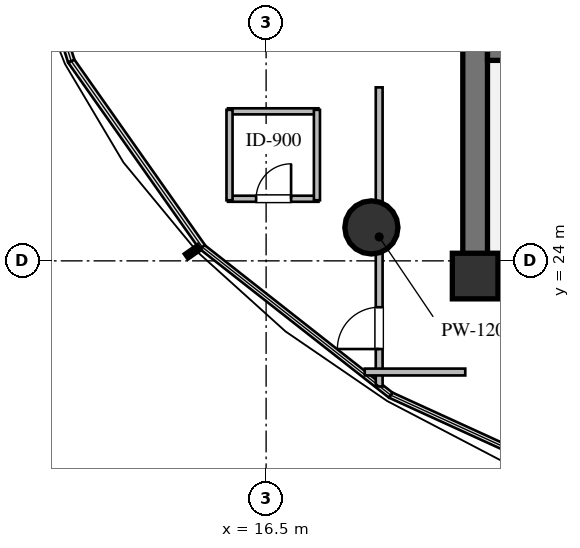
"""IFC4 building model, lengths in metres.
Left out: names, types, materials, properties, quantities, classifications, styles, units other than length and angle.
Written with IfcOpenShell. Run it as: python <this file> out.ifc"""

import sys

from ifc_helpers import new_model, si_unit, direction, frame, frame_2d, origin, origin_2d, place, context, subcontext, project, spatial, rectangle, circle, extrude, element, fill, save


model = new_model("IFC4")
c1 = context("Model", 3, precision=1e-05, world=origin(), true_north=direction((0.0, 1.0)))
c2 = subcontext(c1, "Body", "Model", "MODEL_VIEW")
j1 = project(units=[si_unit("LENGTHUNIT", "METRE"), si_unit("PLANEANGLEUNIT", "RADIAN")], contexts=[c1])
p1 = place(None, origin())
s1 = spatial("IfcSite", under=j1, at=p1, CompositionType="ELEMENT")
p2 = place(p1, origin())
s2 = spatial("IfcBuilding", under=s1, at=p2, CompositionType="ELEMENT")
p3 = place(p2, frame((0.0, 0.0, 38.4)))
s3 = spatial("IfcBuildingStorey", under=s2, at=p3, CompositionType="ELEMENT", Elevation=38.4)
p4 = place(p3, frame((21.675, 23.6, 0.0), z_axis=(0.0, 0.0, 1.0), x_axis=(1.0, 0.0, 0.0)))
e1 = element("IfcWall", 1, at=p4, inside=s3, PredefinedType="SHEAR", context=c2, shape_type="SweptSolid", body=[
    extrude(rectangle(XDim=22.65, YDim=0.65, at=frame_2d((11.325, 0.0))), origin(), (0.0, 0.0, 1.0), 3.36),
])
p5 = place(p3, frame((22.0, 23.925, 0.0), z_axis=(0.0, 0.0, 1.0), x_axis=(0.0, 1.0, 0.0)))
e2 = element("IfcWall", 2, at=p5, inside=s3, PredefinedType="SHEAR", context=c2, shape_type="SweptSolid", body=[
    extrude(rectangle(XDim=12.15, YDim=0.65, at=frame_2d((6.075, 0.0))), origin(), (0.0, 0.0, 1.0), 3.36),
])
p6 = place(p3, frame((22.325, 29.6, 0.0), z_axis=(0.0, 0.0, 1.0), x_axis=(1.0, 0.0, 0.0)))
e3 = element("IfcWall", 3, at=p6, inside=s3, PredefinedType="SHEAR", context=c2, shape_type="SweptSolid", body=[
    extrude(rectangle(XDim=21.35, YDim=0.65, at=frame_2d((10.675, 0.0))), origin(), (0.0, 0.0, 1.0), 3.36),
])
p7 = place(p6, frame((12.125, 0.0, 0.0)))
e4 = element("IfcOpeningElement", 4, at=p7, cuts=e3, PredefinedType="OPENING", context=c2, shape_type="SweptSolid", body=[
    extrude(rectangle(XDim=1.15, YDim=2.1, at=frame_2d((0.575, 1.05))), frame((0.0, 0.335, 0.0), z_axis=(0.0, -1.0, 0.0), x_axis=(1.0, 0.0, 0.0)), (0.0, 0.0, 1.0), 0.67),
])
p8 = place(p3, frame((22.0, 23.6, 0.0), z_axis=(0.0, 0.0, 1.0), x_axis=(1.0, 0.0, 0.0)))
e5 = element("IfcColumn", 5, at=p8, inside=s3, PredefinedType="COLUMN", context=c2, shape_type="SweptSolid", body=[
    extrude(rectangle(XDim=1.2, YDim=1.2, at=origin_2d()), origin(), (0.0, 0.0, 1.0), 3.6),
])
p9 = place(p3, frame((19.27, 24.88, 0.0), z_axis=(0.0, 0.0, 1.0), x_axis=(1.0, 0.0, 0.0)))
e6 = element("IfcColumn", 6, at=p9, inside=s3, PredefinedType="COLUMN", context=c2, shape_type="SweptSolid", body=[
    extrude(circle(Radius=0.7, at=origin_2d()), origin(), (0.0, 0.0, 1.0), 3.6),
])
p10 = place(p3, frame((15.497, 25.634, 0.0), z_axis=(0.0, 0.0, 1.0), x_axis=(1.0, 0.0, 0.0)))
e7 = element("IfcWall", 7, at=p10, inside=s3, PredefinedType="PLUMBINGWALL", context=c2, shape_type="SweptSolid", body=[
    extrude(rectangle(XDim=2.38, YDim=0.16, at=frame_2d((1.19, 0.0))), origin(), (0.0, 0.0, 1.0), 3.36),
])
p11 = place(p10, frame((0.74, 0.0, 0.0)))
e8 = element("IfcOpeningElement", 8, at=p11, cuts=e7, PredefinedType="OPENING", context=c2, shape_type="SweptSolid", body=[
    extrude(rectangle(XDim=0.92, YDim=2.1, at=frame_2d((0.46, 1.05))), frame((0.0, 0.09, 0.0), z_axis=(0.0, -1.0, 0.0), x_axis=(1.0, 0.0, 0.0)), (0.0, 0.0, 1.0), 0.18),
])
p12 = place(p3, frame((15.497, 27.934, 0.0), z_axis=(0.0, 0.0, 1.0), x_axis=(1.0, 0.0, 0.0)))
e9 = element("IfcWall", 9, at=p12, inside=s3, PredefinedType="PLUMBINGWALL", context=c2, shape_type="SweptSolid", body=[
    extrude(rectangle(XDim=2.38, YDim=0.16, at=frame_2d((1.19, 0.0))), origin(), (0.0, 0.0, 1.0), 3.36),
])
p13 = place(p3, frame((15.537, 25.594, 0.0), z_axis=(0.0, 0.0, 1.0), x_axis=(0.0, 1.0, 0.0)))
e10 = element("IfcWall", 10, at=p13, inside=s3, PredefinedType="PLUMBINGWALL", context=c2, shape_type="SweptSolid", body=[
    extrude(rectangle(XDim=2.38, YDim=0.16, at=frame_2d((1.19, 0.0))), origin(), (0.0, 0.0, 1.0), 3.36),
])
p14 = place(p3, frame((17.837, 25.594, 0.0), z_axis=(0.0, 0.0, 1.0), x_axis=(0.0, 1.0, 0.0)))
e11 = element("IfcWall", 11, at=p14, inside=s3, PredefinedType="PLUMBINGWALL", context=c2, shape_type="SweptSolid", body=[
    extrude(rectangle(XDim=2.38, YDim=0.16, at=frame_2d((1.19, 0.0))), origin(), (0.0, 0.0, 1.0), 2.738),
])
p15 = place(p3, frame((19.475, 20.695, 0.0), z_axis=(0.0, 0.0, 1.0), x_axis=(0.0, 1.0, 0.0)))
e12 = element("IfcWall", 12, at=p15, inside=s3, PredefinedType="PARTITIONING", context=c2, shape_type="SweptSolid", body=[
    extrude(rectangle(XDim=7.87, YDim=0.18, at=frame_2d((3.935, 0.0))), origin(), (0.0, 0.0, 1.0), 2.738),
])
p16 = place(p15, frame((0.985, 0.0, 0.0)))
e13 = element("IfcOpeningElement", 13, at=p16, cuts=e12, PredefinedType="OPENING", context=c2, shape_type="SweptSolid", body=[
    extrude(rectangle(XDim=1.1, YDim=2.1, at=frame_2d((0.55, 1.05))), frame((0.0, 0.1, 0.0), z_axis=(0.0, -1.0, 0.0), x_axis=(1.0, 0.0, 0.0)), (0.0, 0.0, 1.0), 0.2),
])
p17 = place(p3, frame((21.74, 21.075, 0.0), z_axis=(0.0, 0.0, 1.0), x_axis=(-1.0, 0.0, 0.0)))
e14 = element("IfcWall", 14, at=p17, inside=s3, PredefinedType="PARTITIONING", context=c2, shape_type="SweptSolid", body=[
    extrude(rectangle(XDim=2.645, YDim=0.18, at=frame_2d((1.323, 0.0))), origin(), (0.0, 0.0, 1.0), 3.36),
])
p18 = place(p11, origin())
e15 = element("IfcDoor", 15, at=p18, inside=s3, OperationType="SINGLE_SWING_RIGHT", PredefinedType="DOOR", context=c2, shape_type="SweptSolid", body=[
    extrude(rectangle(XDim=0.92, YDim=2.1, at=frame_2d((0.46, 1.05))), frame((0.0, 0.025, 0.0), z_axis=(0.0, -1.0, 0.0), x_axis=(1.0, 0.0, 0.0)), (0.0, 0.0, 1.0), 0.05),
])
fill(e8, e15)
p19 = place(p16, origin())
e16 = element("IfcDoor", 16, at=p19, inside=s3, OperationType="SINGLE_SWING_LEFT", PredefinedType="DOOR", context=c2, shape_type="SweptSolid", body=[
    extrude(rectangle(XDim=1.1, YDim=2.1, at=frame_2d((0.55, 1.05))), frame((0.0, 0.025, 0.0), z_axis=(0.0, -1.0, 0.0), x_axis=(1.0, 0.0, 0.0)), (0.0, 0.0, 1.0), 0.05),
])
fill(e13, e16)
save(model, sys.argv[1])
